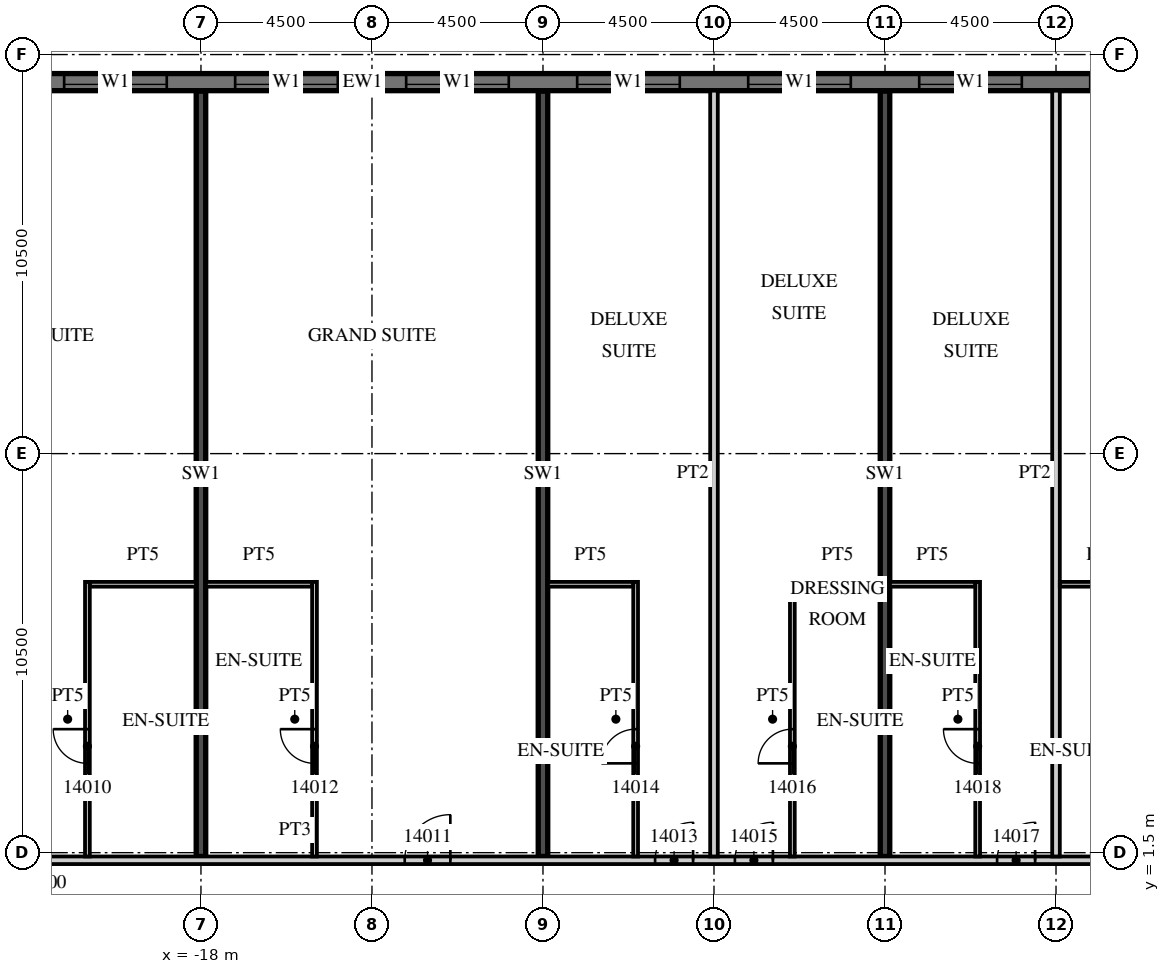
"""IFC4 building model, lengths in metres.
Left out: names, types, materials, properties, quantities, classifications, styles, units other than length and angle.
Written with IfcOpenShell. Run it as: python <this file> out.ifc"""

import sys

from ifc_helpers import new_model, si_unit, direction, frame, frame_2d, origin, place, context, subcontext, project, spatial, rectangle, extrude, element, fill, save


model = new_model("IFC4")
c1 = context("Model", 3, precision=1e-05, world=origin(), true_north=direction((0.0, 1.0)))
c2 = subcontext(c1, "Body", "Model", "MODEL_VIEW")
j1 = project(units=[si_unit("LENGTHUNIT", "METRE"), si_unit("PLANEANGLEUNIT", "RADIAN")], contexts=[c1])
p1 = place(None, origin())
s1 = spatial("IfcSite", under=j1, at=p1, CompositionType="ELEMENT")
p2 = place(p1, origin())
s2 = spatial("IfcBuilding", under=s1, at=p2, CompositionType="ELEMENT")
p3 = place(p2, frame((0.0, 0.0, 76.5)))
s3 = spatial("IfcBuildingStorey", under=s2, at=p3, CompositionType="ELEMENT", Elevation=76.5)
for number, where, z_axis, x_axis in (
    (1, (-18.0, 1.4, 0.0), (0.0, 0.0, 1.0), (0.0, 1.0, 0.0)),
    (2, (-9.0, 1.4, 0.0), (0.0, 0.0, 1.0), (0.0, 1.0, 0.0)),
    (3, (0.0, 1.4, 0.0), (0.0, 0.0, 1.0), (0.0, 1.0, 0.0)),
):
    element("IfcWall", number, at=place(p3, frame(where, z_axis=z_axis, x_axis=x_axis)), inside=s3, PredefinedType="SHEAR", context=c2, shape_type="SweptSolid", body=[
        extrude(rectangle(XDim=20.14, YDim=0.25, at=frame_2d((10.07, 0.0))), origin(), (0.0, 0.0, 1.0), 3.3),
    ])
p4 = place(p3, frame((13.5, 21.775, 0.0), z_axis=(0.0, 0.0, 1.0), x_axis=(-1.0, 0.0, 0.0)))
e4 = element("IfcWall", 4, at=p4, inside=s3, PredefinedType="SOLIDWALL", context=c2, shape_type="SweptSolid", body=[
    extrude(rectangle(XDim=54.5, YDim=0.45, at=frame_2d((27.25, 0.0))), origin(), (0.0, 0.0, 1.0), 3.02),
])
p5 = place(p4, frame((0.9, 0.0, 0.45)))
e5 = element("IfcOpeningElement", 5, at=p5, cuts=e4, PredefinedType="OPENING", context=c2, shape_type="SweptSolid", body=[
    extrude(rectangle(XDim=2.7, YDim=2.25, at=frame_2d((1.35, 1.125))), frame((0.0, 0.235, 0.0), z_axis=(0.0, -1.0, 0.0), x_axis=(1.0, 0.0, 0.0)), (0.0, 0.0, 1.0), 0.47),
])
p6 = place(p4, frame((5.4, 0.0, 0.45)))
e6 = element("IfcOpeningElement", 6, at=p6, cuts=e4, PredefinedType="OPENING", context=c2, shape_type="SweptSolid", body=[
    extrude(rectangle(XDim=2.7, YDim=2.25, at=frame_2d((1.35, 1.125))), frame((0.0, 0.235, 0.0), z_axis=(0.0, -1.0, 0.0), x_axis=(1.0, 0.0, 0.0)), (0.0, 0.0, 1.0), 0.47),
])
p7 = place(p4, frame((9.9, 0.0, 0.45)))
e7 = element("IfcOpeningElement", 7, at=p7, cuts=e4, PredefinedType="OPENING", context=c2, shape_type="SweptSolid", body=[
    extrude(rectangle(XDim=2.7, YDim=2.25, at=frame_2d((1.35, 1.125))), frame((0.0, 0.235, 0.0), z_axis=(0.0, -1.0, 0.0), x_axis=(1.0, 0.0, 0.0)), (0.0, 0.0, 1.0), 0.47),
])
p8 = place(p4, frame((14.4, 0.0, 0.45)))
e8 = element("IfcOpeningElement", 8, at=p8, cuts=e4, PredefinedType="OPENING", context=c2, shape_type="SweptSolid", body=[
    extrude(rectangle(XDim=2.7, YDim=2.25, at=frame_2d((1.35, 1.125))), frame((0.0, 0.235, 0.0), z_axis=(0.0, -1.0, 0.0), x_axis=(1.0, 0.0, 0.0)), (0.0, 0.0, 1.0), 0.47),
])
p9 = place(p4, frame((18.9, 0.0, 0.45)))
e9 = element("IfcOpeningElement", 9, at=p9, cuts=e4, PredefinedType="OPENING", context=c2, shape_type="SweptSolid", body=[
    extrude(rectangle(XDim=2.7, YDim=2.25, at=frame_2d((1.35, 1.125))), frame((0.0, 0.235, 0.0), z_axis=(0.0, -1.0, 0.0), x_axis=(1.0, 0.0, 0.0)), (0.0, 0.0, 1.0), 0.47),
])
p10 = place(p4, frame((23.4, 0.0, 0.45)))
e10 = element("IfcOpeningElement", 10, at=p10, cuts=e4, PredefinedType="OPENING", context=c2, shape_type="SweptSolid", body=[
    extrude(rectangle(XDim=2.7, YDim=2.25, at=frame_2d((1.35, 1.125))), frame((0.0, 0.235, 0.0), z_axis=(0.0, -1.0, 0.0), x_axis=(1.0, 0.0, 0.0)), (0.0, 0.0, 1.0), 0.47),
])
p11 = place(p4, frame((27.9, 0.0, 0.45)))
e11 = element("IfcOpeningElement", 11, at=p11, cuts=e4, PredefinedType="OPENING", context=c2, shape_type="SweptSolid", body=[
    extrude(rectangle(XDim=2.7, YDim=2.25, at=frame_2d((1.35, 1.125))), frame((0.0, 0.235, 0.0), z_axis=(0.0, -1.0, 0.0), x_axis=(1.0, 0.0, 0.0)), (0.0, 0.0, 1.0), 0.47),
])
p12 = place(p4, frame((32.4, 0.0, 0.45)))
e12 = element("IfcOpeningElement", 12, at=p12, cuts=e4, PredefinedType="OPENING", context=c2, shape_type="SweptSolid", body=[
    extrude(rectangle(XDim=2.7, YDim=2.25, at=frame_2d((1.35, 1.125))), frame((0.0, 0.235, 0.0), z_axis=(0.0, -1.0, 0.0), x_axis=(1.0, 0.0, 0.0)), (0.0, 0.0, 1.0), 0.47),
])
p13 = place(p4, frame((36.9, 0.0, 0.45)))
e13 = element("IfcOpeningElement", 13, at=p13, cuts=e4, PredefinedType="OPENING", context=c2, shape_type="SweptSolid", body=[
    extrude(rectangle(XDim=2.7, YDim=2.25, at=frame_2d((1.35, 1.125))), frame((0.0, 0.235, 0.0), z_axis=(0.0, -1.0, 0.0), x_axis=(1.0, 0.0, 0.0)), (0.0, 0.0, 1.0), 0.47),
])
p14 = place(p4, frame((41.4, 0.0, 0.45)))
e14 = element("IfcOpeningElement", 14, at=p14, cuts=e4, PredefinedType="OPENING", context=c2, shape_type="SweptSolid", body=[
    extrude(rectangle(XDim=2.7, YDim=2.25, at=frame_2d((1.35, 1.125))), frame((0.0, 0.235, 0.0), z_axis=(0.0, -1.0, 0.0), x_axis=(1.0, 0.0, 0.0)), (0.0, 0.0, 1.0), 0.47),
])
p15 = place(p4, frame((45.9, 0.0, 0.45)))
e15 = element("IfcOpeningElement", 15, at=p15, cuts=e4, PredefinedType="OPENING", context=c2, shape_type="SweptSolid", body=[
    extrude(rectangle(XDim=2.7, YDim=2.25, at=frame_2d((1.35, 1.125))), frame((0.0, 0.235, 0.0), z_axis=(0.0, -1.0, 0.0), x_axis=(1.0, 0.0, 0.0)), (0.0, 0.0, 1.0), 0.47),
])
p16 = place(p4, frame((50.4, 0.0, 0.45)))
e16 = element("IfcOpeningElement", 16, at=p16, cuts=e4, PredefinedType="OPENING", context=c2, shape_type="SweptSolid", body=[
    extrude(rectangle(XDim=2.7, YDim=2.25, at=frame_2d((1.35, 1.125))), frame((0.0, 0.235, 0.0), z_axis=(0.0, -1.0, 0.0), x_axis=(1.0, 0.0, 0.0)), (0.0, 0.0, 1.0), 0.47),
])
p17 = place(p3, frame((-44.55, 1.3, 0.0), z_axis=(0.0, 0.0, 1.0), x_axis=(1.0, 0.0, 0.0)))
e17 = element("IfcWall", 17, at=p17, inside=s3, PredefinedType="PARTITIONING", context=c2, shape_type="SweptSolid", body=[
    extrude(rectangle(XDim=58.05, YDim=0.2, at=frame_2d((29.025, 0.0))), origin(), (0.0, 0.0, 1.0), 3.02),
])
p18 = place(p17, frame((0.525, 0.0, 0.0)))
e18 = element("IfcOpeningElement", 18, at=p18, cuts=e17, PredefinedType="OPENING", context=c2, shape_type="SweptSolid", body=[
    extrude(rectangle(XDim=1.0, YDim=2.1, at=frame_2d((0.5, 1.05))), frame((0.0, 0.11, 0.0), z_axis=(0.0, -1.0, 0.0), x_axis=(1.0, 0.0, 0.0)), (0.0, 0.0, 1.0), 0.22),
])
p19 = place(p17, frame((6.975, 0.0, 0.0)))
e19 = element("IfcOpeningElement", 19, at=p19, cuts=e17, PredefinedType="OPENING", context=c2, shape_type="SweptSolid", body=[
    extrude(rectangle(XDim=1.0, YDim=2.1, at=frame_2d((0.5, 1.05))), frame((0.0, 0.11, 0.0), z_axis=(0.0, -1.0, 0.0), x_axis=(1.0, 0.0, 0.0)), (0.0, 0.0, 1.0), 0.22),
])
p20 = place(p17, frame((9.125, 0.0, 0.0)))
e20 = element("IfcOpeningElement", 20, at=p20, cuts=e17, PredefinedType="OPENING", context=c2, shape_type="SweptSolid", body=[
    extrude(rectangle(XDim=1.0, YDim=2.1, at=frame_2d((0.5, 1.05))), frame((0.0, 0.11, 0.0), z_axis=(0.0, -1.0, 0.0), x_axis=(1.0, 0.0, 0.0)), (0.0, 0.0, 1.0), 0.22),
])
p21 = place(p17, frame((13.6, 0.0, 0.0)))
e21 = element("IfcOpeningElement", 21, at=p21, cuts=e17, PredefinedType="OPENING", context=c2, shape_type="SweptSolid", body=[
    extrude(rectangle(XDim=1.0, YDim=2.1, at=frame_2d((0.5, 1.05))), frame((0.0, 0.11, 0.0), z_axis=(0.0, -1.0, 0.0), x_axis=(1.0, 0.0, 0.0)), (0.0, 0.0, 1.0), 0.22),
])
p22 = place(p17, frame((19.987, 0.0, 0.0)))
e22 = element("IfcOpeningElement", 22, at=p22, cuts=e17, PredefinedType="OPENING", context=c2, shape_type="SweptSolid", body=[
    extrude(rectangle(XDim=1.2, YDim=2.1, at=frame_2d((0.6, 1.05))), frame((0.0, 0.11, 0.0), z_axis=(0.0, -1.0, 0.0), x_axis=(1.0, 0.0, 0.0)), (0.0, 0.0, 1.0), 0.22),
])
p23 = place(p17, frame((31.912, 0.0, 0.0)))
e23 = element("IfcOpeningElement", 23, at=p23, cuts=e17, PredefinedType="OPENING", context=c2, shape_type="SweptSolid", body=[
    extrude(rectangle(XDim=1.2, YDim=2.1, at=frame_2d((0.6, 1.05))), frame((0.0, 0.11, 0.0), z_axis=(0.0, -1.0, 0.0), x_axis=(1.0, 0.0, 0.0)), (0.0, 0.0, 1.0), 0.22),
])
p24 = place(p17, frame((38.5, 0.0, 0.0)))
e24 = element("IfcOpeningElement", 24, at=p24, cuts=e17, PredefinedType="OPENING", context=c2, shape_type="SweptSolid", body=[
    extrude(rectangle(XDim=1.0, YDim=2.1, at=frame_2d((0.5, 1.05))), frame((0.0, 0.11, 0.0), z_axis=(0.0, -1.0, 0.0), x_axis=(1.0, 0.0, 0.0)), (0.0, 0.0, 1.0), 0.22),
])
p25 = place(p17, frame((40.6, 0.0, 0.0)))
e25 = element("IfcOpeningElement", 25, at=p25, cuts=e17, PredefinedType="OPENING", context=c2, shape_type="SweptSolid", body=[
    extrude(rectangle(XDim=1.0, YDim=2.1, at=frame_2d((0.5, 1.05))), frame((0.0, 0.11, 0.0), z_axis=(0.0, -1.0, 0.0), x_axis=(1.0, 0.0, 0.0)), (0.0, 0.0, 1.0), 0.22),
])
p26 = place(p17, frame((47.5, 0.0, 0.0)))
e26 = element("IfcOpeningElement", 26, at=p26, cuts=e17, PredefinedType="OPENING", context=c2, shape_type="SweptSolid", body=[
    extrude(rectangle(XDim=1.0, YDim=2.1, at=frame_2d((0.5, 1.05))), frame((0.0, 0.11, 0.0), z_axis=(0.0, -1.0, 0.0), x_axis=(1.0, 0.0, 0.0)), (0.0, 0.0, 1.0), 0.22),
])
p27 = place(p17, frame((51.975, 0.0, 0.0)))
e27 = element("IfcOpeningElement", 27, at=p27, cuts=e17, PredefinedType="OPENING", context=c2, shape_type="SweptSolid", body=[
    extrude(rectangle(XDim=1.0, YDim=2.1, at=frame_2d((0.5, 1.05))), frame((0.0, 0.11, 0.0), z_axis=(0.0, -1.0, 0.0), x_axis=(1.0, 0.0, 0.0)), (0.0, 0.0, 1.0), 0.22),
])
p28 = place(p17, frame((56.475, 0.0, 0.0)))
e28 = element("IfcOpeningElement", 28, at=p28, cuts=e17, PredefinedType="OPENING", context=c2, shape_type="SweptSolid", body=[
    extrude(rectangle(XDim=1.0, YDim=2.1, at=frame_2d((0.5, 1.05))), frame((0.0, 0.11, 0.0), z_axis=(0.0, -1.0, 0.0), x_axis=(1.0, 0.0, 0.0)), (0.0, 0.0, 1.0), 0.22),
])
p29 = place(p3, frame((-20.988, 1.4, 0.0), z_axis=(0.0, 0.0, 1.0), x_axis=(0.0, 1.0, 0.0)))
e29 = element("IfcWall", 29, at=p29, inside=s3, PredefinedType="PARTITIONING", context=c2, shape_type="SweptSolid", body=[
    extrude(rectangle(XDim=7.225, YDim=0.125, at=frame_2d((3.613, 0.0))), origin(), (0.0, 0.0, 1.0), 3.02),
])
p30 = place(p29, frame((2.45, 0.0, 0.0)))
e30 = element("IfcOpeningElement", 30, at=p30, cuts=e29, PredefinedType="OPENING", context=c2, shape_type="SweptSolid", body=[
    extrude(rectangle(XDim=0.9, YDim=2.1, at=frame_2d((0.45, 1.05))), frame((0.0, 0.073, 0.0), z_axis=(0.0, -1.0, 0.0), x_axis=(1.0, 0.0, 0.0)), (0.0, 0.0, 1.0), 0.145),
])
p31 = place(p3, frame((-20.925, 8.562, 0.0), z_axis=(0.0, 0.0, 1.0), x_axis=(1.0, 0.0, 0.0)))
e31 = element("IfcWall", 31, at=p31, inside=s3, PredefinedType="PARTITIONING", context=c2, shape_type="SweptSolid", body=[
    extrude(rectangle(XDim=2.8, YDim=0.125, at=frame_2d((1.4, 0.0))), origin(), (0.0, 0.0, 1.0), 3.02),
])
p32 = place(p3, frame((-15.012, 1.4, 0.0), z_axis=(0.0, 0.0, 1.0), x_axis=(0.0, 1.0, 0.0)))
e32 = element("IfcWall", 32, at=p32, inside=s3, PredefinedType="PARTITIONING", context=c2, shape_type="SweptSolid", body=[
    extrude(rectangle(XDim=7.225, YDim=0.125, at=frame_2d((3.613, 0.0))), origin(), (0.0, 0.0, 1.0), 3.02),
])
p33 = place(p32, frame((2.45, 0.0, 0.0)))
e33 = element("IfcOpeningElement", 33, at=p33, cuts=e32, PredefinedType="OPENING", context=c2, shape_type="SweptSolid", body=[
    extrude(rectangle(XDim=0.9, YDim=2.1, at=frame_2d((0.45, 1.05))), frame((0.0, 0.073, 0.0), z_axis=(0.0, -1.0, 0.0), x_axis=(1.0, 0.0, 0.0)), (0.0, 0.0, 1.0), 0.145),
])
p34 = place(p3, frame((-17.875, 8.562, 0.0), z_axis=(0.0, 0.0, 1.0), x_axis=(1.0, 0.0, 0.0)))
e34 = element("IfcWall", 34, at=p34, inside=s3, PredefinedType="PARTITIONING", context=c2, shape_type="SweptSolid", body=[
    extrude(rectangle(XDim=2.8, YDim=0.125, at=frame_2d((1.4, 0.0))), origin(), (0.0, 0.0, 1.0), 3.02),
])
p35 = place(p3, frame((-4.5, 1.4, 0.0), z_axis=(0.0, 0.0, 1.0), x_axis=(0.0, 1.0, 0.0)))
e35 = element("IfcWall", 35, at=p35, inside=s3, PredefinedType="PARTITIONING", context=c2, shape_type="SweptSolid", body=[
    extrude(rectangle(XDim=20.15, YDim=0.2, at=frame_2d((10.075, 0.0))), origin(), (0.0, 0.0, 1.0), 3.02),
])
p36 = place(p3, frame((-6.562, 1.4, 0.0), z_axis=(0.0, 0.0, 1.0), x_axis=(0.0, 1.0, 0.0)))
e36 = element("IfcWall", 36, at=p36, inside=s3, PredefinedType="PARTITIONING", context=c2, shape_type="SweptSolid", body=[
    extrude(rectangle(XDim=7.225, YDim=0.125, at=frame_2d((3.613, 0.0))), origin(), (0.0, 0.0, 1.0), 3.02),
])
p37 = place(p36, frame((2.45, 0.0, 0.0)))
e37 = element("IfcOpeningElement", 37, at=p37, cuts=e36, PredefinedType="OPENING", context=c2, shape_type="SweptSolid", body=[
    extrude(rectangle(XDim=0.9, YDim=2.1, at=frame_2d((0.45, 1.05))), frame((0.0, 0.073, 0.0), z_axis=(0.0, -1.0, 0.0), x_axis=(1.0, 0.0, 0.0)), (0.0, 0.0, 1.0), 0.145),
])
p38 = place(p3, frame((-8.875, 8.562, 0.0), z_axis=(0.0, 0.0, 1.0), x_axis=(1.0, 0.0, 0.0)))
e38 = element("IfcWall", 38, at=p38, inside=s3, PredefinedType="PARTITIONING", context=c2, shape_type="SweptSolid", body=[
    extrude(rectangle(XDim=2.25, YDim=0.125, at=frame_2d((1.125, 0.0))), origin(), (0.0, 0.0, 1.0), 3.02),
])
p39 = place(p3, frame((-2.438, 1.4, 0.0), z_axis=(0.0, 0.0, 1.0), x_axis=(0.0, 1.0, 0.0)))
e39 = element("IfcWall", 39, at=p39, inside=s3, PredefinedType="PARTITIONING", context=c2, shape_type="SweptSolid", body=[
    extrude(rectangle(XDim=7.225, YDim=0.125, at=frame_2d((3.613, 0.0))), origin(), (0.0, 0.0, 1.0), 3.02),
])
p40 = place(p39, frame((2.45, 0.0, 0.0)))
e40 = element("IfcOpeningElement", 40, at=p40, cuts=e39, PredefinedType="OPENING", context=c2, shape_type="SweptSolid", body=[
    extrude(rectangle(XDim=0.9, YDim=2.1, at=frame_2d((0.45, 1.05))), frame((0.0, 0.073, 0.0), z_axis=(0.0, -1.0, 0.0), x_axis=(1.0, 0.0, 0.0)), (0.0, 0.0, 1.0), 0.145),
])
p41 = place(p3, frame((-2.375, 8.562, 0.0), z_axis=(0.0, 0.0, 1.0), x_axis=(1.0, 0.0, 0.0)))
e41 = element("IfcWall", 41, at=p41, inside=s3, PredefinedType="PARTITIONING", context=c2, shape_type="SweptSolid", body=[
    extrude(rectangle(XDim=2.25, YDim=0.125, at=frame_2d((1.125, 0.0))), origin(), (0.0, 0.0, 1.0), 3.02),
])
p42 = place(p3, frame((4.5, 1.4, 0.0), z_axis=(0.0, 0.0, 1.0), x_axis=(0.0, 1.0, 0.0)))
e42 = element("IfcWall", 42, at=p42, inside=s3, PredefinedType="PARTITIONING", context=c2, shape_type="SweptSolid", body=[
    extrude(rectangle(XDim=20.15, YDim=0.2, at=frame_2d((10.075, 0.0))), origin(), (0.0, 0.0, 1.0), 3.02),
])
p43 = place(p3, frame((2.438, 1.4, 0.0), z_axis=(0.0, 0.0, 1.0), x_axis=(0.0, 1.0, 0.0)))
e43 = element("IfcWall", 43, at=p43, inside=s3, PredefinedType="PARTITIONING", context=c2, shape_type="SweptSolid", body=[
    extrude(rectangle(XDim=7.225, YDim=0.125, at=frame_2d((3.613, 0.0))), origin(), (0.0, 0.0, 1.0), 3.02),
])
p44 = place(p43, frame((2.45, 0.0, 0.0)))
e44 = element("IfcOpeningElement", 44, at=p44, cuts=e43, PredefinedType="OPENING", context=c2, shape_type="SweptSolid", body=[
    extrude(rectangle(XDim=0.9, YDim=2.1, at=frame_2d((0.45, 1.05))), frame((0.0, 0.073, 0.0), z_axis=(0.0, -1.0, 0.0), x_axis=(1.0, 0.0, 0.0)), (0.0, 0.0, 1.0), 0.145),
])
for number, where, z_axis, x_axis in (
    (45, (0.125, 8.562, 0.0), (0.0, 0.0, 1.0), (1.0, 0.0, 0.0)),
    (46, (4.6, 8.562, 0.0), (0.0, 0.0, 1.0), (1.0, 0.0, 0.0)),
):
    element("IfcWall", number, at=place(p3, frame(where, z_axis=z_axis, x_axis=x_axis)), inside=s3, PredefinedType="PARTITIONING", context=c2, shape_type="SweptSolid", body=[
        extrude(rectangle(XDim=2.25, YDim=0.125, at=frame_2d((1.125, 0.0))), origin(), (0.0, 0.0, 1.0), 3.02),
    ])
p45 = place(p7, origin())
e47 = element("IfcWindow", 47, at=p45, inside=s3, PartitioningType="SINGLE_PANEL", PredefinedType="WINDOW", context=c2, shape_type="SweptSolid", body=[
    extrude(rectangle(XDim=2.7, YDim=2.25, at=frame_2d((1.35, 1.125))), frame((0.0, 0.09, 0.0), z_axis=(0.0, -1.0, 0.0), x_axis=(1.0, 0.0, 0.0)), (0.0, 0.0, 1.0), 0.06),
])
fill(e7, e47)
p46 = place(p8, origin())
e48 = element("IfcWindow", 48, at=p46, inside=s3, PartitioningType="SINGLE_PANEL", PredefinedType="WINDOW", context=c2, shape_type="SweptSolid", body=[
    extrude(rectangle(XDim=2.7, YDim=2.25, at=frame_2d((1.35, 1.125))), frame((0.0, 0.09, 0.0), z_axis=(0.0, -1.0, 0.0), x_axis=(1.0, 0.0, 0.0)), (0.0, 0.0, 1.0), 0.06),
])
fill(e8, e48)
p47 = place(p9, origin())
e49 = element("IfcWindow", 49, at=p47, inside=s3, PartitioningType="SINGLE_PANEL", PredefinedType="WINDOW", context=c2, shape_type="SweptSolid", body=[
    extrude(rectangle(XDim=2.7, YDim=2.25, at=frame_2d((1.35, 1.125))), frame((0.0, 0.09, 0.0), z_axis=(0.0, -1.0, 0.0), x_axis=(1.0, 0.0, 0.0)), (0.0, 0.0, 1.0), 0.06),
])
fill(e9, e49)
p48 = place(p10, origin())
e50 = element("IfcWindow", 50, at=p48, inside=s3, PartitioningType="SINGLE_PANEL", PredefinedType="WINDOW", context=c2, shape_type="SweptSolid", body=[
    extrude(rectangle(XDim=2.7, YDim=2.25, at=frame_2d((1.35, 1.125))), frame((0.0, 0.09, 0.0), z_axis=(0.0, -1.0, 0.0), x_axis=(1.0, 0.0, 0.0)), (0.0, 0.0, 1.0), 0.06),
])
fill(e10, e50)
p49 = place(p11, origin())
e51 = element("IfcWindow", 51, at=p49, inside=s3, PartitioningType="SINGLE_PANEL", PredefinedType="WINDOW", context=c2, shape_type="SweptSolid", body=[
    extrude(rectangle(XDim=2.7, YDim=2.25, at=frame_2d((1.35, 1.125))), frame((0.0, 0.09, 0.0), z_axis=(0.0, -1.0, 0.0), x_axis=(1.0, 0.0, 0.0)), (0.0, 0.0, 1.0), 0.06),
])
fill(e11, e51)
p50 = place(p12, origin())
e52 = element("IfcWindow", 52, at=p50, inside=s3, PartitioningType="SINGLE_PANEL", PredefinedType="WINDOW", context=c2, shape_type="SweptSolid", body=[
    extrude(rectangle(XDim=2.7, YDim=2.25, at=frame_2d((1.35, 1.125))), frame((0.0, 0.09, 0.0), z_axis=(0.0, -1.0, 0.0), x_axis=(1.0, 0.0, 0.0)), (0.0, 0.0, 1.0), 0.06),
])
fill(e12, e52)
p51 = place(p30, origin())
e53 = element("IfcDoor", 53, at=p51, inside=s3, OperationType="SINGLE_SWING_RIGHT", PredefinedType="DOOR", context=c2, shape_type="SweptSolid", body=[
    extrude(rectangle(XDim=0.9, YDim=2.1, at=frame_2d((0.45, 1.05))), frame((0.0, 0.025, 0.0), z_axis=(0.0, -1.0, 0.0), x_axis=(1.0, 0.0, 0.0)), (0.0, 0.0, 1.0), 0.05),
])
fill(e30, e53)
p52 = place(p23, origin())
e54 = element("IfcDoor", 54, at=p52, inside=s3, OperationType="SINGLE_SWING_RIGHT", PredefinedType="DOOR", context=c2, shape_type="SweptSolid", body=[
    extrude(rectangle(XDim=1.2, YDim=2.1, at=frame_2d((0.6, 1.05))), frame((0.0, 0.025, 0.0), z_axis=(0.0, -1.0, 0.0), x_axis=(1.0, 0.0, 0.0)), (0.0, 0.0, 1.0), 0.05),
])
fill(e23, e54)
p53 = place(p33, origin())
e55 = element("IfcDoor", 55, at=p53, inside=s3, OperationType="SINGLE_SWING_RIGHT", PredefinedType="DOOR", context=c2, shape_type="SweptSolid", body=[
    extrude(rectangle(XDim=0.9, YDim=2.1, at=frame_2d((0.45, 1.05))), frame((0.0, 0.025, 0.0), z_axis=(0.0, -1.0, 0.0), x_axis=(1.0, 0.0, 0.0)), (0.0, 0.0, 1.0), 0.05),
])
fill(e33, e55)
p54 = place(p24, origin())
e56 = element("IfcDoor", 56, at=p54, inside=s3, OperationType="SINGLE_SWING_RIGHT", PredefinedType="DOOR", context=c2, shape_type="SweptSolid", body=[
    extrude(rectangle(XDim=1.0, YDim=2.1, at=frame_2d((0.5, 1.05))), frame((0.0, 0.025, 0.0), z_axis=(0.0, -1.0, 0.0), x_axis=(1.0, 0.0, 0.0)), (0.0, 0.0, 1.0), 0.05),
])
fill(e24, e56)
p55 = place(p37, origin())
e57 = element("IfcDoor", 57, at=p55, inside=s3, OperationType="SINGLE_SWING_LEFT", PredefinedType="DOOR", context=c2, shape_type="SweptSolid", body=[
    extrude(rectangle(XDim=0.9, YDim=2.1, at=frame_2d((0.45, 1.05))), frame((0.0, 0.025, 0.0), z_axis=(0.0, -1.0, 0.0), x_axis=(1.0, 0.0, 0.0)), (0.0, 0.0, 1.0), 0.05),
])
fill(e37, e57)
p56 = place(p25, origin())
e58 = element("IfcDoor", 58, at=p56, inside=s3, OperationType="SINGLE_SWING_RIGHT", PredefinedType="DOOR", context=c2, shape_type="SweptSolid", body=[
    extrude(rectangle(XDim=1.0, YDim=2.1, at=frame_2d((0.5, 1.05))), frame((0.0, 0.025, 0.0), z_axis=(0.0, -1.0, 0.0), x_axis=(1.0, 0.0, 0.0)), (0.0, 0.0, 1.0), 0.05),
])
fill(e25, e58)
p57 = place(p40, origin())
e59 = element("IfcDoor", 59, at=p57, inside=s3, OperationType="SINGLE_SWING_LEFT", PredefinedType="DOOR", context=c2, shape_type="SweptSolid", body=[
    extrude(rectangle(XDim=0.9, YDim=2.1, at=frame_2d((0.45, 1.05))), frame((0.0, 0.025, 0.0), z_axis=(0.0, -1.0, 0.0), x_axis=(1.0, 0.0, 0.0)), (0.0, 0.0, 1.0), 0.05),
])
fill(e40, e59)
p58 = place(p26, origin())
e60 = element("IfcDoor", 60, at=p58, inside=s3, OperationType="SINGLE_SWING_RIGHT", PredefinedType="DOOR", context=c2, shape_type="SweptSolid", body=[
    extrude(rectangle(XDim=1.0, YDim=2.1, at=frame_2d((0.5, 1.05))), frame((0.0, 0.025, 0.0), z_axis=(0.0, -1.0, 0.0), x_axis=(1.0, 0.0, 0.0)), (0.0, 0.0, 1.0), 0.05),
])
fill(e26, e60)
p59 = place(p44, origin())
e61 = element("IfcDoor", 61, at=p59, inside=s3, OperationType="SINGLE_SWING_RIGHT", PredefinedType="DOOR", context=c2, shape_type="SweptSolid", body=[
    extrude(rectangle(XDim=0.9, YDim=2.1, at=frame_2d((0.45, 1.05))), frame((0.0, 0.025, 0.0), z_axis=(0.0, -1.0, 0.0), x_axis=(1.0, 0.0, 0.0)), (0.0, 0.0, 1.0), 0.05),
])
fill(e44, e61)
save(model, sys.argv[1])
